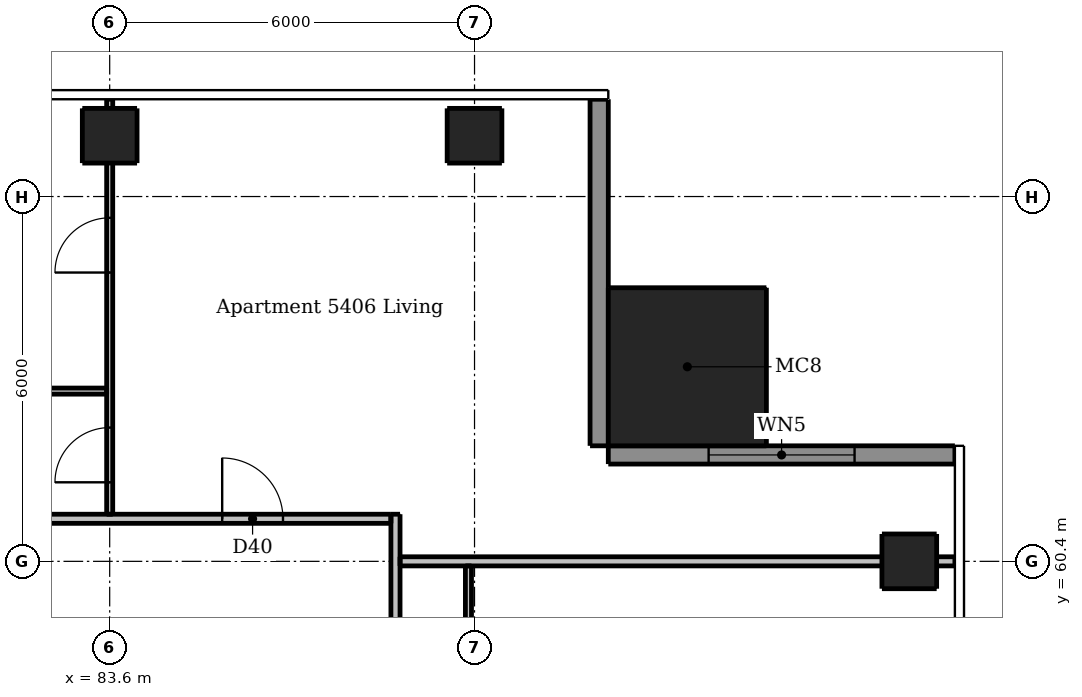
"""IFC4 building model, lengths in metres.
Left out: names, types, materials, properties, quantities, classifications, styles, units other than length and angle.
Written with IfcOpenShell. Run it as: python <this file> out.ifc"""

import sys

from ifc_helpers import new_model, si_unit, direction, frame, frame_2d, origin, origin_2d, place, context, subcontext, project, spatial, rectangle, extrude, element, fill, save


model = new_model("IFC4")
c1 = context("Model", 3, precision=1e-05, world=origin(), true_north=direction((0.0, 1.0)))
c2 = subcontext(c1, "Body", "Model", "MODEL_VIEW")
j1 = project(units=[si_unit("LENGTHUNIT", "METRE"), si_unit("PLANEANGLEUNIT", "RADIAN")], contexts=[c1])
p1 = place(None, origin())
s1 = spatial("IfcSite", under=j1, at=p1, CompositionType="ELEMENT")
p2 = place(p1, origin())
s2 = spatial("IfcBuilding", under=s1, at=p2, CompositionType="ELEMENT")
p3 = place(p2, frame((0.0, 0.0, 203.5)))
s3 = spatial("IfcBuildingStorey", under=s2, at=p3, CompositionType="ELEMENT", Elevation=203.5)
for number, where, z_axis, x_axis in (
    (1, (96.75, 60.4, 0.0), (0.0, 0.0, 1.0), (1.0, 0.0, 0.0)),
    (2, (83.6, 67.4, 0.0), (0.0, 0.0, 1.0), (1.0, 0.0, 0.0)),
    (3, (89.6, 67.4, 0.0), (0.0, 0.0, 1.0), (1.0, 0.0, 0.0)),
):
    element("IfcColumn", number, at=place(p3, frame(where, z_axis=z_axis, x_axis=x_axis)), inside=s3, PredefinedType="COLUMN", context=c2, shape_type="SweptSolid", body=[
        extrude(rectangle(XDim=0.9, YDim=0.9, at=origin_2d()), origin(), (0.0, 0.0, 1.0), 3.05),
    ])
p4 = place(p3, frame((93.1, 63.6, 0.0), z_axis=(0.0, 0.0, 1.0), x_axis=(1.0, 0.0, 0.0)))
e4 = element("IfcColumn", 4, at=p4, inside=s3, PredefinedType="COLUMN", context=c2, shape_type="SweptSolid", body=[
    extrude(rectangle(XDim=2.6, YDim=2.6, at=origin_2d()), origin(), (0.0, 0.0, 1.0), 3.3),
])
p5 = place(p3, frame((97.5, 62.15, 0.0), z_axis=(0.0, 0.0, 1.0), x_axis=(-1.0, 0.0, 0.0)))
e5 = element("IfcWall", 5, at=p5, inside=s3, PredefinedType="SOLIDWALL", context=c2, shape_type="SweptSolid", body=[
    extrude(rectangle(XDim=5.7, YDim=0.3, at=frame_2d((2.85, 0.0))), origin(), (0.0, 0.0, 1.0), 3.05),
])
p6 = place(p5, frame((1.65, 0.0, 0.15)))
e6 = element("IfcOpeningElement", 6, at=p6, cuts=e5, PredefinedType="OPENING", context=c2, shape_type="SweptSolid", body=[
    extrude(rectangle(XDim=2.4, YDim=2.1, at=frame_2d((1.2, 1.05))), frame((0.0, 0.16, 0.0), z_axis=(0.0, -1.0, 0.0), x_axis=(1.0, 0.0, 0.0)), (0.0, 0.0, 1.0), 0.32),
])
p7 = place(p3, frame((91.65, 62.3, 0.0), z_axis=(0.0, 0.0, 1.0), x_axis=(0.0, 1.0, 0.0)))
e7 = element("IfcWall", 7, at=p7, inside=s3, PredefinedType="SOLIDWALL", context=c2, shape_type="SweptSolid", body=[
    extrude(rectangle(XDim=5.7, YDim=0.3, at=frame_2d((2.85, 0.0))), origin(), (0.0, 0.0, 1.0), 3.05),
])
p8 = place(p3, frame((83.6, 61.175, 0.0), z_axis=(0.0, 0.0, 1.0), x_axis=(0.0, 1.0, 0.0)))
e8 = element("IfcWall", 8, at=p8, inside=s3, PredefinedType="PARTITIONING", context=c2, shape_type="SweptSolid", body=[
    extrude(rectangle(XDim=6.825, YDim=0.1, at=frame_2d((3.413, 0.0))), origin(), (0.0, 0.0, 1.0), 2.516),
])
p9 = place(p8, frame((0.525, 0.0, 0.0)))
e9 = element("IfcOpeningElement", 9, at=p9, cuts=e8, PredefinedType="OPENING", context=c2, shape_type="SweptSolid", body=[
    extrude(rectangle(XDim=0.9, YDim=2.1, at=frame_2d((0.45, 1.05))), frame((0.0, 0.06, 0.0), z_axis=(0.0, -1.0, 0.0), x_axis=(1.0, 0.0, 0.0)), (0.0, 0.0, 1.0), 0.12),
])
p10 = place(p8, frame((3.975, 0.0, 0.0)))
e10 = element("IfcOpeningElement", 10, at=p10, cuts=e8, PredefinedType="OPENING", context=c2, shape_type="SweptSolid", body=[
    extrude(rectangle(XDim=0.9, YDim=2.1, at=frame_2d((0.45, 1.05))), frame((0.0, 0.06, 0.0), z_axis=(0.0, -1.0, 0.0), x_axis=(1.0, 0.0, 0.0)), (0.0, 0.0, 1.0), 0.12),
])
p11 = place(p3, frame((89.5, 60.325, 0.0), z_axis=(0.0, 0.0, 1.0), x_axis=(0.0, -1.0, 0.0)))
e11 = element("IfcWall", 11, at=p11, inside=s3, PredefinedType="PARTITIONING", context=c2, shape_type="SweptSolid", body=[
    extrude(rectangle(XDim=20.85, YDim=0.1, at=frame_2d((10.425, 0.0))), origin(), (0.0, 0.0, 1.0), 2.51),
])
p12 = place(p11, frame((10.575, 0.0, 0.0)))
e12 = element("IfcOpeningElement", 12, at=p12, cuts=e11, PredefinedType="OPENING", context=c2, shape_type="SweptSolid", body=[
    extrude(rectangle(XDim=0.9, YDim=2.1, at=frame_2d((0.45, 1.05))), frame((0.0, 0.06, 0.0), z_axis=(0.0, -1.0, 0.0), x_axis=(1.0, 0.0, 0.0)), (0.0, 0.0, 1.0), 0.12),
])
p13 = place(p11, frame((6.675, 0.0, 0.0)))
e13 = element("IfcOpeningElement", 13, at=p13, cuts=e11, PredefinedType="OPENING", context=c2, shape_type="SweptSolid", body=[
    extrude(rectangle(XDim=0.9, YDim=2.1, at=frame_2d((0.45, 1.05))), frame((0.0, 0.06, 0.0), z_axis=(0.0, -1.0, 0.0), x_axis=(1.0, 0.0, 0.0)), (0.0, 0.0, 1.0), 0.12),
])
p14 = place(p11, frame((8.775, 0.0, 0.0)))
e14 = element("IfcOpeningElement", 14, at=p14, cuts=e11, PredefinedType="OPENING", context=c2, shape_type="SweptSolid", body=[
    extrude(rectangle(XDim=0.9, YDim=2.1, at=frame_2d((0.45, 1.05))), frame((0.0, 0.06, 0.0), z_axis=(0.0, -1.0, 0.0), x_axis=(1.0, 0.0, 0.0)), (0.0, 0.0, 1.0), 0.12),
])
p15 = place(p11, frame((19.075, 0.0, 0.0)))
e15 = element("IfcOpeningElement", 15, at=p15, cuts=e11, PredefinedType="OPENING", context=c2, shape_type="SweptSolid", body=[
    extrude(rectangle(XDim=0.9, YDim=2.1, at=frame_2d((0.45, 1.05))), frame((0.0, 0.06, 0.0), z_axis=(0.0, -1.0, 0.0), x_axis=(1.0, 0.0, 0.0)), (0.0, 0.0, 1.0), 0.12),
])
p16 = place(p11, frame((15.775, 0.0, 0.0)))
e16 = element("IfcOpeningElement", 16, at=p16, cuts=e11, PredefinedType="OPENING", context=c2, shape_type="SweptSolid", body=[
    extrude(rectangle(XDim=0.9, YDim=2.1, at=frame_2d((0.45, 1.05))), frame((0.0, 0.06, 0.0), z_axis=(0.0, -1.0, 0.0), x_axis=(1.0, 0.0, 0.0)), (0.0, 0.0, 1.0), 0.12),
])
p17 = place(p11, frame((1.275, 0.0, 0.0)))
e17 = element("IfcOpeningElement", 17, at=p17, cuts=e11, PredefinedType="OPENING", context=c2, shape_type="SweptSolid", body=[
    extrude(rectangle(XDim=0.9, YDim=2.1, at=frame_2d((0.45, 1.05))), frame((0.0, 0.06, 0.0), z_axis=(0.0, -1.0, 0.0), x_axis=(1.0, 0.0, 0.0)), (0.0, 0.0, 1.0), 0.12),
])
p18 = place(p11, frame((12.725, 0.0, 0.0)))
e18 = element("IfcOpeningElement", 18, at=p18, cuts=e11, PredefinedType="OPENING", context=c2, shape_type="SweptSolid", body=[
    extrude(rectangle(XDim=0.8, YDim=2.1, at=frame_2d((0.4, 1.05))), frame((0.0, 0.06, 0.0), z_axis=(0.0, -1.0, 0.0), x_axis=(1.0, 0.0, 0.0)), (0.0, 0.0, 1.0), 0.12),
])
p19 = place(p11, frame((4.325, 0.0, 0.0)))
e19 = element("IfcOpeningElement", 19, at=p19, cuts=e11, PredefinedType="OPENING", context=c2, shape_type="SweptSolid", body=[
    extrude(rectangle(XDim=0.8, YDim=2.1, at=frame_2d((0.4, 1.05))), frame((0.0, 0.06, 0.0), z_axis=(0.0, -1.0, 0.0), x_axis=(1.0, 0.0, 0.0)), (0.0, 0.0, 1.0), 0.12),
])
p20 = place(p3, frame((83.55, 63.2, 0.0), z_axis=(0.0, 0.0, 1.0), x_axis=(-1.0, 0.0, 0.0)))
e20 = element("IfcWall", 20, at=p20, inside=s3, PredefinedType="PARTITIONING", context=c2, shape_type="SweptSolid", body=[
    extrude(rectangle(XDim=5.875, YDim=0.1, at=frame_2d((2.938, 0.0))), origin(), (0.0, 0.0, 1.0), 3.05),
])
p21 = place(p20, frame((3.75, 0.0, 0.0)))
e21 = element("IfcOpeningElement", 21, at=p21, cuts=e20, PredefinedType="OPENING", context=c2, shape_type="SweptSolid", body=[
    extrude(rectangle(XDim=0.8, YDim=2.1, at=frame_2d((0.4, 1.05))), frame((0.0, 0.06, 0.0), z_axis=(0.0, -1.0, 0.0), x_axis=(1.0, 0.0, 0.0)), (0.0, 0.0, 1.0), 0.12),
])
p22 = place(p3, frame((88.3, 61.175, 0.0), z_axis=(0.0, 0.0, 1.0), x_axis=(0.0, -1.0, 0.0)))
e22 = element("IfcWall", 22, at=p22, inside=s3, PredefinedType="PARTITIONING", context=c2, shape_type="SweptSolid", body=[
    extrude(rectangle(XDim=29.4, YDim=0.15, at=frame_2d((14.7, 0.0))), origin(), (0.0, 0.0, 1.0), 3.05),
])
p23 = place(p22, frame((28.125, 0.0, 0.0)))
e23 = element("IfcOpeningElement", 23, at=p23, cuts=e22, PredefinedType="OPENING", context=c2, shape_type="SweptSolid", body=[
    extrude(rectangle(XDim=1.0, YDim=2.1, at=frame_2d((0.5, 1.05))), frame((0.0, 0.085, 0.0), z_axis=(0.0, -1.0, 0.0), x_axis=(1.0, 0.0, 0.0)), (0.0, 0.0, 1.0), 0.17),
])
p24 = place(p22, frame((10.775, 0.0, 0.0)))
e24 = element("IfcOpeningElement", 24, at=p24, cuts=e22, PredefinedType="OPENING", context=c2, shape_type="SweptSolid", body=[
    extrude(rectangle(XDim=1.0, YDim=2.1, at=frame_2d((0.5, 1.05))), frame((0.0, 0.085, 0.0), z_axis=(0.0, -1.0, 0.0), x_axis=(1.0, 0.0, 0.0)), (0.0, 0.0, 1.0), 0.17),
])
p25 = place(p3, frame((58.975, 61.1, 0.0), z_axis=(0.0, 0.0, 1.0), x_axis=(1.0, 0.0, 0.0)))
e25 = element("IfcWall", 25, at=p25, inside=s3, PredefinedType="PARTITIONING", context=c2, shape_type="SweptSolid", body=[
    extrude(rectangle(XDim=29.25, YDim=0.15, at=frame_2d((14.625, 0.0))), origin(), (0.0, 0.0, 1.0), 3.05),
])
p26 = place(p25, frame((7.925, 0.0, 0.0)))
e26 = element("IfcOpeningElement", 26, at=p26, cuts=e25, PredefinedType="OPENING", context=c2, shape_type="SweptSolid", body=[
    extrude(rectangle(XDim=1.0, YDim=2.1, at=frame_2d((0.5, 1.05))), frame((0.0, 0.085, 0.0), z_axis=(0.0, -1.0, 0.0), x_axis=(1.0, 0.0, 0.0)), (0.0, 0.0, 1.0), 0.17),
])
p27 = place(p25, frame((26.475, 0.0, 0.0)))
e27 = element("IfcOpeningElement", 27, at=p27, cuts=e25, PredefinedType="OPENING", context=c2, shape_type="SweptSolid", body=[
    extrude(rectangle(XDim=1.0, YDim=2.1, at=frame_2d((0.5, 1.05))), frame((0.0, 0.085, 0.0), z_axis=(0.0, -1.0, 0.0), x_axis=(1.0, 0.0, 0.0)), (0.0, 0.0, 1.0), 0.17),
])
p28 = place(p3, frame((88.375, 60.4, 0.0), z_axis=(0.0, 0.0, 1.0), x_axis=(1.0, 0.0, 0.0)))
e28 = element("IfcWall", 28, at=p28, inside=s3, PredefinedType="PARTITIONING", context=c2, shape_type="SweptSolid", body=[
    extrude(rectangle(XDim=9.125, YDim=0.15, at=frame_2d((4.562, 0.0))), origin(), (0.0, 0.0, 1.0), 2.59),
])
p29 = place(p6, origin())
e29 = element("IfcWindow", 29, at=p29, inside=s3, PartitioningType="DOUBLE_PANEL_VERTICAL", PredefinedType="WINDOW", context=c2, shape_type="SweptSolid", body=[
    extrude(rectangle(XDim=2.4, YDim=2.1, at=frame_2d((1.2, 1.05))), frame((0.0, 0.03, 0.0), z_axis=(0.0, -1.0, 0.0), x_axis=(1.0, 0.0, 0.0)), (0.0, 0.0, 1.0), 0.06),
])
fill(e6, e29)
p30 = place(p27, origin())
e30 = element("IfcDoor", 30, at=p30, inside=s3, OperationType="SINGLE_SWING_LEFT", PredefinedType="DOOR", context=c2, shape_type="SweptSolid", body=[
    extrude(rectangle(XDim=1.0, YDim=2.1, at=frame_2d((0.5, 1.05))), frame((0.0, 0.025, 0.0), z_axis=(0.0, -1.0, 0.0), x_axis=(1.0, 0.0, 0.0)), (0.0, 0.0, 1.0), 0.05),
])
fill(e27, e30)
p31 = place(p9, origin())
e31 = element("IfcDoor", 31, at=p31, inside=s3, OperationType="SINGLE_SWING_LEFT", PredefinedType="DOOR", context=c2, shape_type="SweptSolid", body=[
    extrude(rectangle(XDim=0.9, YDim=2.1, at=frame_2d((0.45, 1.05))), frame((0.0, 0.025, 0.0), z_axis=(0.0, -1.0, 0.0), x_axis=(1.0, 0.0, 0.0)), (0.0, 0.0, 1.0), 0.05),
])
fill(e9, e31)
p32 = place(p10, origin())
e32 = element("IfcDoor", 32, at=p32, inside=s3, OperationType="SINGLE_SWING_LEFT", PredefinedType="DOOR", context=c2, shape_type="SweptSolid", body=[
    extrude(rectangle(XDim=0.9, YDim=2.1, at=frame_2d((0.45, 1.05))), frame((0.0, 0.025, 0.0), z_axis=(0.0, -1.0, 0.0), x_axis=(1.0, 0.0, 0.0)), (0.0, 0.0, 1.0), 0.05),
])
fill(e10, e32)
save(model, sys.argv[1])
